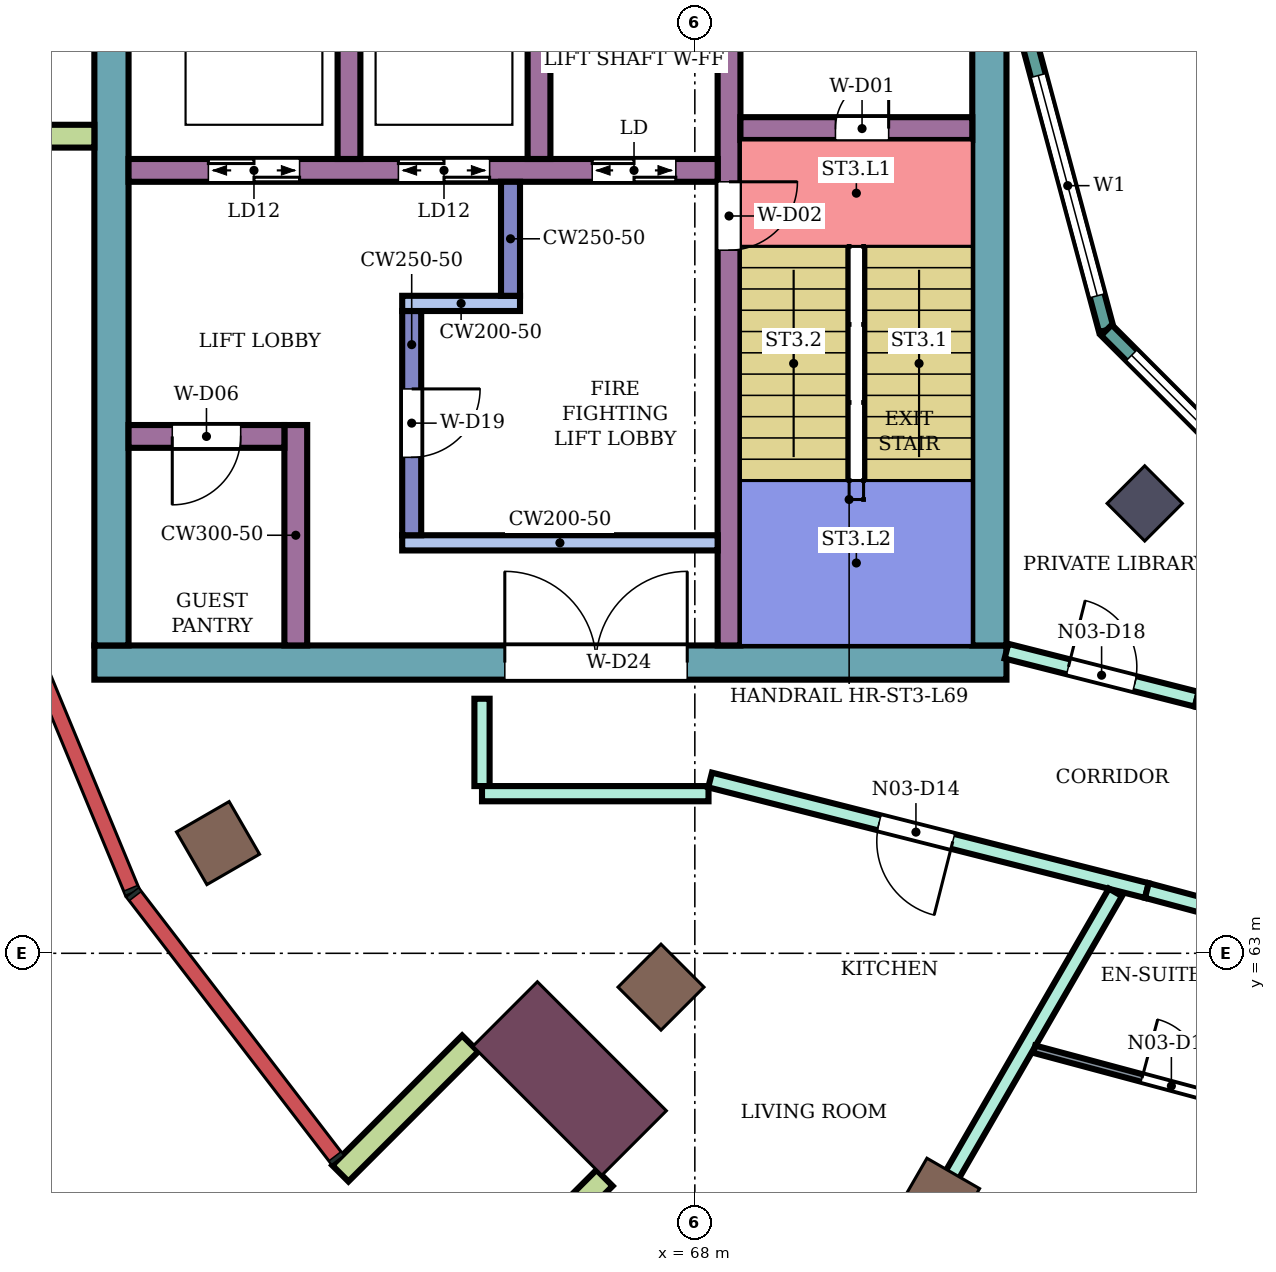
"""IFC4 building model, lengths in metres.
Left out: names, types, materials, properties, quantities, classifications, styles, units other than length and angle.
Written with IfcOpenShell. Run it as: python <this file> out.ifc"""

import sys

from ifc_helpers import new_model, si_unit, direction, frame, frame_2d, origin, origin_2d, place, context, subcontext, project, spatial, rectangle, extrude, element, fill, save


model = new_model("IFC4")
c1 = context("Model", 3, precision=1e-05, world=origin(), true_north=direction((0.0, 1.0)))
c2 = subcontext(c1, "Body", "Model", "MODEL_VIEW")
j1 = project(units=[si_unit("LENGTHUNIT", "METRE"), si_unit("PLANEANGLEUNIT", "RADIAN")], contexts=[c1])
p1 = place(None, origin())
s1 = spatial("IfcSite", under=j1, at=p1, CompositionType="ELEMENT")
p2 = place(p1, origin())
s2 = spatial("IfcBuilding", under=s1, at=p2, CompositionType="ELEMENT")
p3 = place(p2, frame((0.0, 0.0, 300.9)))
s3 = spatial("IfcBuildingStorey", under=s2, at=p3, CompositionType="ELEMENT", Elevation=300.9)
for number, where, z_axis, x_axis in (
    (1, (61.727, 64.45, 0.0), (0.0, 0.0, 1.0), (-0.866, -0.5, 0.0)),
    (2, (67.555, 62.555, 0.0), (0.0, 0.0, 1.0), (-0.707, -0.707, 0.0)),
    (3, (71.2, 59.758, 0.0), (0.0, 0.0, 1.0), (-0.5, -0.866, 0.0)),
):
    element("IfcColumn", number, at=place(p3, frame(where, z_axis=z_axis, x_axis=x_axis)), inside=s3, PredefinedType="COLUMN", context=c2, shape_type="SweptSolid", body=[
        extrude(rectangle(XDim=0.8, YDim=0.8, at=origin_2d()), origin(), (0.0, 0.0, 1.0), 4.2),
    ])
p4 = place(p3, frame((73.919, 68.919, 0.0), z_axis=(0.0, 0.0, 1.0), x_axis=(-0.707106781187, -0.707106781187, 0.0)))
e4 = element("IfcColumn", 4, at=p4, inside=s3, PredefinedType="COLUMN", context=c2, shape_type="SweptSolid", body=[
    extrude(rectangle(XDim=0.7, YDim=0.7, at=origin_2d()), origin(), (0.0, 0.0, 1.0), 4.2),
])
p5 = place(p3, frame((66.353, 61.353, 0.0), z_axis=(0.0, 0.0, 1.0), x_axis=(-0.707106781187, -0.707106781187, 0.0)))
e5 = element("IfcColumn", 5, at=p5, inside=s3, PredefinedType="COLUMN", context=c2, shape_type="SweptSolid", body=[
    extrude(rectangle(XDim=1.2, YDim=2.4, at=origin_2d()), origin(), (0.0, 0.0, 1.0), 4.2),
])
p6 = place(p3, frame((72.1, 66.825, 0.0), z_axis=(0.0, 0.0, 1.0), x_axis=(-1.0, 0.0, 0.0)))
e6 = element("IfcWall", 6, at=p6, inside=s3, PredefinedType="SHEAR", context=c2, shape_type="SweptSolid", body=[
    extrude(rectangle(XDim=12.0, YDim=0.45, at=frame_2d((6.0, 0.0))), origin(), (0.0, 0.0, 1.0), 3.88),
])
p7 = place(p6, frame((4.2, 0.0, 0.0)))
e7 = element("IfcOpeningElement", 7, at=p7, cuts=e6, PredefinedType="OPENING", context=c2, shape_type="SweptSolid", body=[
    extrude(rectangle(XDim=2.4, YDim=2.4, at=frame_2d((1.2, 1.2))), frame((0.0, 0.235, 0.0), z_axis=(0.0, -1.0, 0.0), x_axis=(1.0, 0.0, 0.0)), (0.0, 0.0, 1.0), 0.47),
])
p8 = place(p3, frame((71.875, 75.0, 0.0), z_axis=(0.0, 0.0, 1.0), x_axis=(0.0, -1.0, 0.0)))
e8 = element("IfcWall", 8, at=p8, inside=s3, PredefinedType="SHEAR", context=c2, shape_type="SweptSolid", body=[
    extrude(rectangle(XDim=7.95, YDim=0.45, at=frame_2d((3.975, 0.0))), origin(), (0.0, 0.0, 1.0), 3.88),
])
p9 = place(p3, frame((60.325, 76.4, 0.0), z_axis=(0.0, 0.0, 1.0), x_axis=(0.0, -1.0, 0.0)))
e9 = element("IfcWall", 9, at=p9, inside=s3, PredefinedType="SHEAR", context=c2, shape_type="SweptSolid", body=[
    extrude(rectangle(XDim=9.35, YDim=0.45, at=frame_2d((4.675, 0.0))), origin(), (0.0, 0.0, 1.0), 3.88),
])
p10 = place(p3, frame((68.45, 75.0, 0.0), z_axis=(0.0, 0.0, 1.0), x_axis=(0.0, -1.0, 0.0)))
e10 = element("IfcWall", 10, at=p10, inside=s3, PredefinedType="SHEAR", context=c2, shape_type="SweptSolid", body=[
    extrude(rectangle(XDim=7.95, YDim=0.3, at=frame_2d((3.975, 0.0))), origin(), (0.0, 0.0, 1.0), 3.88),
])
p11 = place(p10, frame((1.85, 0.0, 0.0)))
e11 = element("IfcOpeningElement", 11, at=p11, cuts=e10, PredefinedType="OPENING", context=c2, shape_type="SweptSolid", body=[
    extrude(rectangle(XDim=0.9, YDim=2.1, at=frame_2d((0.45, 1.05))), frame((0.0, 0.16, 0.0), z_axis=(0.0, -1.0, 0.0), x_axis=(1.0, 0.0, 0.0)), (0.0, 0.0, 1.0), 0.32),
])
p12 = place(p3, frame((71.65, 73.85, 0.0), z_axis=(0.0, 0.0, 1.0), x_axis=(-1.0, 0.0, 0.0)))
e12 = element("IfcWall", 12, at=p12, inside=s3, PredefinedType="SHEAR", context=c2, shape_type="SweptSolid", body=[
    extrude(rectangle(XDim=3.05, YDim=0.3, at=frame_2d((1.525, 0.0))), origin(), (0.0, 0.0, 1.0), 3.88),
])
p13 = place(p12, frame((1.1, 0.0, 0.0)))
e13 = element("IfcOpeningElement", 13, at=p13, cuts=e12, PredefinedType="OPENING", context=c2, shape_type="SweptSolid", body=[
    extrude(rectangle(XDim=0.7, YDim=2.0, at=frame_2d((0.35, 1.0))), frame((0.0, 0.16, 0.0), z_axis=(0.0, -1.0, 0.0), x_axis=(1.0, 0.0, 0.0)), (0.0, 0.0, 1.0), 0.32),
])
p14 = place(p3, frame((68.3, 73.3, 0.0), z_axis=(0.0, 0.0, 1.0), x_axis=(-1.0, 0.0, 0.0)))
e14 = element("IfcWall", 14, at=p14, inside=s3, PredefinedType="SHEAR", context=c2, shape_type="SweptSolid", body=[
    extrude(rectangle(XDim=7.75, YDim=0.3, at=frame_2d((3.875, 0.0))), origin(), (0.0, 0.0, 1.0), 3.88),
])
p15 = place(p14, frame((0.55, 0.0, 0.0)))
e15 = element("IfcOpeningElement", 15, at=p15, cuts=e14, PredefinedType="OPENING", context=c2, shape_type="SweptSolid", body=[
    extrude(rectangle(XDim=1.1, YDim=2.1, at=frame_2d((0.55, 1.05))), frame((0.0, 0.16, 0.0), z_axis=(0.0, -1.0, 0.0), x_axis=(1.0, 0.0, 0.0)), (0.0, 0.0, 1.0), 0.32),
])
p16 = place(p14, frame((3.0, 0.0, 0.0)))
e16 = element("IfcOpeningElement", 16, at=p16, cuts=e14, PredefinedType="OPENING", context=c2, shape_type="SweptSolid", body=[
    extrude(rectangle(XDim=1.2, YDim=2.1, at=frame_2d((0.6, 1.05))), frame((0.0, 0.16, 0.0), z_axis=(0.0, -1.0, 0.0), x_axis=(1.0, 0.0, 0.0)), (0.0, 0.0, 1.0), 0.32),
])
p17 = place(p14, frame((5.5, 0.0, 0.0)))
e17 = element("IfcOpeningElement", 17, at=p17, cuts=e14, PredefinedType="OPENING", context=c2, shape_type="SweptSolid", body=[
    extrude(rectangle(XDim=1.2, YDim=2.1, at=frame_2d((0.6, 1.05))), frame((0.0, 0.16, 0.0), z_axis=(0.0, -1.0, 0.0), x_axis=(1.0, 0.0, 0.0)), (0.0, 0.0, 1.0), 0.32),
])
for number, where, z_axis, x_axis in (
    (18, (65.95, 76.0, 0.0), (0.0, 0.0, 1.0), (0.0, -1.0, 0.0)),
    (19, (63.45, 76.0, 0.0), (0.0, 0.0, 1.0), (0.0, -1.0, 0.0)),
):
    element("IfcWall", number, at=place(p3, frame(where, z_axis=z_axis, x_axis=x_axis)), inside=s3, PredefinedType="SHEAR", context=c2, shape_type="SweptSolid", body=[
        extrude(rectangle(XDim=2.55, YDim=0.3, at=frame_2d((1.275, 0.0))), origin(), (0.0, 0.0, 1.0), 3.88),
    ])
p18 = place(p3, frame((68.3, 68.4, 0.0), z_axis=(0.0, 0.0, 1.0), x_axis=(-1.0, 0.0, 0.0)))
e20 = element("IfcWall", 20, at=p18, inside=s3, PredefinedType="SHEAR", context=c2, shape_type="SweptSolid", body=[
    extrude(rectangle(XDim=4.15, YDim=0.2, at=frame_2d((2.075, 0.0))), origin(), (0.0, 0.0, 1.0), 3.88),
])
p19 = place(p3, frame((64.275, 71.45, 0.0), z_axis=(0.0, 0.0, 1.0), x_axis=(0.0, -1.0, 0.0)))
e21 = element("IfcWall", 21, at=p19, inside=s3, PredefinedType="SHEAR", context=c2, shape_type="SweptSolid", body=[
    extrude(rectangle(XDim=2.95, YDim=0.25, at=frame_2d((1.475, 0.0))), origin(), (0.0, 0.0, 1.0), 3.88),
])
p20 = place(p19, frame((1.025, 0.0, 0.0)))
e22 = element("IfcOpeningElement", 22, at=p20, cuts=e21, PredefinedType="OPENING", context=c2, shape_type="SweptSolid", body=[
    extrude(rectangle(XDim=0.9, YDim=2.1, at=frame_2d((0.45, 1.05))), frame((0.0, 0.135, 0.0), z_axis=(0.0, -1.0, 0.0), x_axis=(1.0, 0.0, 0.0)), (0.0, 0.0, 1.0), 0.27),
])
p21 = place(p3, frame((65.7, 71.55, 0.0), z_axis=(0.0, 0.0, 1.0), x_axis=(-1.0, 0.0, 0.0)))
e23 = element("IfcWall", 23, at=p21, inside=s3, PredefinedType="SHEAR", context=c2, shape_type="SweptSolid", body=[
    extrude(rectangle(XDim=1.55, YDim=0.2, at=frame_2d((0.775, 0.0))), origin(), (0.0, 0.0, 1.0), 3.88),
])
p22 = place(p3, frame((65.575, 73.15, 0.0), z_axis=(0.0, 0.0, 1.0), x_axis=(0.0, -1.0, 0.0)))
e24 = element("IfcWall", 24, at=p22, inside=s3, PredefinedType="SHEAR", context=c2, shape_type="SweptSolid", body=[
    extrude(rectangle(XDim=1.5, YDim=0.25, at=frame_2d((0.75, 0.0))), origin(), (0.0, 0.0, 1.0), 3.88),
])
p23 = place(p3, frame((62.75, 69.95, 0.0), z_axis=(0.0, 0.0, 1.0), x_axis=(0.0, -1.0, 0.0)))
e25 = element("IfcWall", 25, at=p23, inside=s3, PredefinedType="SHEAR", context=c2, shape_type="SweptSolid", body=[
    extrude(rectangle(XDim=2.9, YDim=0.3, at=frame_2d((1.45, 0.0))), origin(), (0.0, 0.0, 1.0), 3.88),
])
p24 = place(p3, frame((62.6, 69.8, 0.0), z_axis=(0.0, 0.0, 1.0), x_axis=(-1.0, 0.0, 0.0)))
e26 = element("IfcWall", 26, at=p24, inside=s3, PredefinedType="SHEAR", context=c2, shape_type="SweptSolid", body=[
    extrude(rectangle(XDim=2.05, YDim=0.3, at=frame_2d((1.025, 0.0))), origin(), (0.0, 0.0, 1.0), 3.88),
])
p25 = place(p24, frame((0.575, 0.0, 0.0)))
e27 = element("IfcOpeningElement", 27, at=p25, cuts=e26, PredefinedType="OPENING", context=c2, shape_type="SweptSolid", body=[
    extrude(rectangle(XDim=0.9, YDim=2.1, at=frame_2d((0.45, 1.05))), frame((0.0, 0.16, 0.0), z_axis=(0.0, -1.0, 0.0), x_axis=(1.0, 0.0, 0.0)), (0.0, 0.0, 1.0), 0.32),
])
for number, where, z_axis, x_axis in (
    (28, (60.1, 73.75, 0.0), (0.0, 0.0, 1.0), (-1.0, 0.0, 0.0)),
    (29, (65.045, 61.812, 0.0), (0.0, 0.0, 1.0), (-0.707, -0.707, 0.0)),
    (30, (66.812, 60.045, 0.0), (0.0, 0.0, 1.0), (-0.707, -0.707, 0.0)),
):
    element("IfcWall", number, at=place(p3, frame(where, z_axis=z_axis, x_axis=x_axis)), inside=s3, PredefinedType="NOTDEFINED", context=c2, shape_type="SweptSolid", body=[
        extrude(rectangle(XDim=2.416, YDim=0.3, at=frame_2d((1.208, 0.0))), origin(), (0.0, 0.0, 1.0), 4.2),
    ])
p26 = place(p3, frame((72.396, 75.0, 0.0), z_axis=(0.0, 0.0, 1.0), x_axis=(0.258789828301, -0.965933654434, 0.0)))
e31 = element("IfcWall", 31, at=p26, inside=s3, PredefinedType="NOTDEFINED", context=c2, shape_type="SweptSolid", body=[
    extrude(rectangle(XDim=3.936, YDim=0.2, at=frame_2d((1.968, 0.0))), origin(), (0.0, 0.0, 1.0), 4.2),
])
p27 = place(p26, frame((0.468, 0.0, 0.9)))
e32 = element("IfcOpeningElement", 32, at=p27, cuts=e31, PredefinedType="OPENING", context=c2, shape_type="SweptSolid", body=[
    extrude(rectangle(XDim=3.0, YDim=2.3, at=frame_2d((1.5, 1.15))), frame((0.0, 0.11, 0.0), z_axis=(0.0, -1.0, 0.0), x_axis=(1.0, 0.0, 0.0)), (0.0, 0.0, 1.0), 0.22),
])
p28 = place(p3, frame((73.415, 71.198, 0.0), z_axis=(0.0, 0.0, 1.0), x_axis=(0.707106781187, -0.707106781187, 0.0)))
e33 = element("IfcWall", 33, at=p28, inside=s3, PredefinedType="NOTDEFINED", context=c2, shape_type="SweptSolid", body=[
    extrude(rectangle(XDim=3.936, YDim=0.2, at=frame_2d((1.968, 0.0))), origin(), (0.0, 0.0, 1.0), 4.2),
])
p29 = place(p28, frame((0.468, 0.0, 0.9)))
e34 = element("IfcOpeningElement", 34, at=p29, cuts=e33, PredefinedType="OPENING", context=c2, shape_type="SweptSolid", body=[
    extrude(rectangle(XDim=3.0, YDim=2.3, at=frame_2d((1.5, 1.15))), frame((0.0, 0.11, 0.0), z_axis=(0.0, -1.0, 0.0), x_axis=(1.0, 0.0, 0.0)), (0.0, 0.0, 1.0), 0.22),
])
p30 = place(p3, frame((65.2, 65.2, 0.0), z_axis=(0.0, 0.0, 1.0), x_axis=(0.0, 1.0, 0.0)))
e35 = element("IfcWall", 35, at=p30, inside=s3, PredefinedType="PARTITIONING", context=c2, shape_type="SweptSolid", body=[
    extrude(rectangle(XDim=1.149, YDim=0.2, at=frame_2d((0.575, 0.0))), origin(), (0.0, 0.0, 1.0), 3.75),
])
p31 = place(p3, frame((65.2, 65.1, 0.0), z_axis=(0.0, 0.0, 1.0), x_axis=(1.0, 0.0, 0.0)))
e36 = element("IfcWall", 36, at=p31, inside=s3, PredefinedType="PARTITIONING", context=c2, shape_type="SweptSolid", body=[
    extrude(rectangle(XDim=2.98, YDim=0.2, at=frame_2d((1.49, 0.0))), origin(), (0.0, 0.0, 1.0), 3.75),
])
p32 = place(p3, frame((68.201, 65.28, 0.0), z_axis=(0.0, 0.0, 1.0), x_axis=(0.969421088032, -0.245403247897, 0.0)))
e37 = element("IfcWall", 37, at=p32, inside=s3, PredefinedType="PARTITIONING", context=c2, shape_type="SweptSolid", body=[
    extrude(rectangle(XDim=5.927, YDim=0.2, at=frame_2d((2.964, 0.0))), origin(), (0.0, 0.0, 1.0), 3.75),
])
p33 = place(p32, frame((2.293, 0.0, 0.0)))
e38 = element("IfcOpeningElement", 38, at=p33, cuts=e37, PredefinedType="OPENING", context=c2, shape_type="SweptSolid", body=[
    extrude(rectangle(XDim=1.0, YDim=2.1, at=frame_2d((0.5, 1.05))), frame((0.0, 0.11, 0.0), z_axis=(0.0, -1.0, 0.0), x_axis=(1.0, 0.0, 0.0)), (0.0, 0.0, 1.0), 0.22),
])
p34 = place(p3, frame((68.849, 55.692, 0.0), z_axis=(0.0, 0.0, 1.0), x_axis=(0.50011732958, 0.865957652922, 0.0)))
e39 = element("IfcWall", 39, at=p34, inside=s3, PredefinedType="PARTITIONING", context=c2, shape_type="SweptSolid", body=[
    extrude(rectangle(XDim=9.365, YDim=0.2, at=frame_2d((4.683, 0.0))), origin(), (0.0, 0.0, 1.0), 3.75),
])
p35 = place(p3, frame((72.1, 66.975, 0.0), z_axis=(0.0, 0.0, 1.0), x_axis=(0.969471314457, -0.245204752086, 0.0)))
e40 = element("IfcWall", 40, at=p35, inside=s3, PredefinedType="PARTITIONING", context=c2, shape_type="SweptSolid", body=[
    extrude(rectangle(XDim=2.582, YDim=0.2, at=frame_2d((1.291, 0.0))), origin(), (0.0, 0.0, 1.0), 3.75),
])
p36 = place(p35, frame((0.841, 0.0, 0.0)))
e41 = element("IfcOpeningElement", 41, at=p36, cuts=e40, PredefinedType="OPENING", context=c2, shape_type="SweptSolid", body=[
    extrude(rectangle(XDim=0.9, YDim=2.1, at=frame_2d((0.45, 1.05))), frame((0.0, 0.11, 0.0), z_axis=(0.0, -1.0, 0.0), x_axis=(1.0, 0.0, 0.0)), (0.0, 0.0, 1.0), 0.22),
])
p37 = place(p3, frame((73.947, 63.826, 0.0), z_axis=(0.0, 0.0, 1.0), x_axis=(0.965908253407, -0.258884619088, 0.0)))
e42 = element("IfcWall", 42, at=p37, inside=s3, PredefinedType="PARTITIONING", context=c2, shape_type="SweptSolid", body=[
    extrude(rectangle(XDim=6.217, YDim=0.2, at=frame_2d((3.108, 0.0))), origin(), (0.0, 0.0, 1.0), 3.75),
])
p38 = place(p3, frame((74.603, 66.342, 0.0), z_axis=(0.0, 0.0, 1.0), x_axis=(0.965920893652, -0.258837453254, 0.0)))
e43 = element("IfcWall", 43, at=p38, inside=s3, PredefinedType="PARTITIONING", context=c2, shape_type="SweptSolid", body=[
    extrude(rectangle(XDim=5.458, YDim=0.2, at=frame_2d((2.729, 0.0))), origin(), (0.0, 0.0, 1.0), 3.75),
])
p39 = place(p38, frame((2.512, 0.0, 0.0)))
e44 = element("IfcOpeningElement", 44, at=p39, cuts=e43, PredefinedType="OPENING", context=c2, shape_type="SweptSolid", body=[
    extrude(rectangle(XDim=0.9, YDim=2.1, at=frame_2d((0.45, 1.05))), frame((0.0, 0.11, 0.0), z_axis=(0.0, -1.0, 0.0), x_axis=(1.0, 0.0, 0.0)), (0.0, 0.0, 1.0), 0.22),
])
p40 = place(p3, frame((72.465, 61.739, 0.0), z_axis=(0.0, 0.0, 1.0), x_axis=(0.965899611634, -0.258916859715, 0.0)))
e45 = element("IfcWall", 45, at=p40, inside=s3, PredefinedType="PARTITIONING", context=c2, shape_type="SweptSolid", body=[
    extrude(rectangle(XDim=7.74, YDim=0.1, at=frame_2d((3.87, 0.0))), origin(), (0.0, 0.0, 1.0), 3.75),
])
p41 = place(p40, frame((1.468, 0.0, 0.0)))
e46 = element("IfcOpeningElement", 46, at=p41, cuts=e45, PredefinedType="OPENING", context=c2, shape_type="SweptSolid", body=[
    extrude(rectangle(XDim=0.8, YDim=2.1, at=frame_2d((0.4, 1.05))), frame((0.0, 0.06, 0.0), z_axis=(0.0, -1.0, 0.0), x_axis=(1.0, 0.0, 0.0)), (0.0, 0.0, 1.0), 0.12),
])
p42 = place(p3, frame((74.229, 53.462, 0.0), z_axis=(0.0, 0.0, 1.0), x_axis=(0.258810097991, 0.965928223616, 0.0)))
e47 = element("IfcWall", 47, at=p42, inside=s3, PredefinedType="PARTITIONING", context=c2, shape_type="SweptSolid", body=[
    extrude(rectangle(XDim=9.838, YDim=0.1, at=frame_2d((4.919, 0.0))), origin(), (0.0, 0.0, 1.0), 3.75),
])
p43 = place(p42, frame((3.344, 0.0, 0.0)))
e48 = element("IfcOpeningElement", 48, at=p43, cuts=e47, PredefinedType="OPENING", context=c2, shape_type="SweptSolid", body=[
    extrude(rectangle(XDim=0.9, YDim=2.1, at=frame_2d((0.45, 1.05))), frame((0.0, 0.06, 0.0), z_axis=(0.0, -1.0, 0.0), x_axis=(1.0, 0.0, 0.0)), (0.0, 0.0, 1.0), 0.12),
])
p44 = place(p27, origin())
e49 = element("IfcWindow", 49, at=p44, inside=s3, PartitioningType="SINGLE_PANEL", PredefinedType="WINDOW", context=c2, shape_type="SweptSolid", body=[
    extrude(rectangle(XDim=3.0, YDim=2.3, at=frame_2d((1.5, 1.15))), frame((0.0, 0.03, 0.0), z_axis=(0.0, -1.0, 0.0), x_axis=(1.0, 0.0, 0.0)), (0.0, 0.0, 1.0), 0.06),
])
fill(e32, e49)
p45 = place(p29, origin())
e50 = element("IfcWindow", 50, at=p45, inside=s3, PartitioningType="SINGLE_PANEL", PredefinedType="WINDOW", context=c2, shape_type="SweptSolid", body=[
    extrude(rectangle(XDim=3.0, YDim=2.3, at=frame_2d((1.5, 1.15))), frame((0.0, 0.03, 0.0), z_axis=(0.0, -1.0, 0.0), x_axis=(1.0, 0.0, 0.0)), (0.0, 0.0, 1.0), 0.06),
])
fill(e34, e50)
p46 = place(p41, origin())
e51 = element("IfcDoor", 51, at=p46, inside=s3, OperationType="SINGLE_SWING_LEFT", PredefinedType="DOOR", context=c2, shape_type="SweptSolid", body=[
    extrude(rectangle(XDim=0.8, YDim=2.1, at=frame_2d((0.4, 1.05))), frame((0.0, 0.025, 0.0), z_axis=(0.0, -1.0, 0.0), x_axis=(1.0, 0.0, 0.0)), (0.0, 0.0, 1.0), 0.05),
])
fill(e46, e51)
p47 = place(p33, frame((1.0, 0.0, 0.0), z_axis=(0.0, 0.0, 1.0), x_axis=(-1.0, 0.0, 0.0)))
e52 = element("IfcDoor", 52, at=p47, inside=s3, OperationType="SINGLE_SWING_LEFT", PredefinedType="DOOR", context=c2, shape_type="SweptSolid", body=[
    extrude(rectangle(XDim=1.0, YDim=2.1, at=frame_2d((0.5, 1.05))), frame((0.0, 0.025, 0.0), z_axis=(0.0, -1.0, 0.0), x_axis=(1.0, 0.0, 0.0)), (0.0, 0.0, 1.0), 0.05),
])
fill(e38, e52)
p48 = place(p36, origin())
e53 = element("IfcDoor", 53, at=p48, inside=s3, OperationType="SINGLE_SWING_LEFT", PredefinedType="DOOR", context=c2, shape_type="SweptSolid", body=[
    extrude(rectangle(XDim=0.9, YDim=2.1, at=frame_2d((0.45, 1.05))), frame((0.0, 0.025, 0.0), z_axis=(0.0, -1.0, 0.0), x_axis=(1.0, 0.0, 0.0)), (0.0, 0.0, 1.0), 0.05),
])
fill(e41, e53)
p49 = place(p13, frame((0.7, 0.0, 0.0), z_axis=(0.0, 0.0, 1.0), x_axis=(-1.0, 0.0, 0.0)))
e54 = element("IfcDoor", 54, at=p49, inside=s3, OperationType="SINGLE_SWING_RIGHT", PredefinedType="DOOR", context=c2, shape_type="SweptSolid", body=[
    extrude(rectangle(XDim=0.7, YDim=2.0, at=frame_2d((0.35, 1.0))), frame((0.0, 0.025, 0.0), z_axis=(0.0, -1.0, 0.0), x_axis=(1.0, 0.0, 0.0)), (0.0, 0.0, 1.0), 0.05),
])
fill(e13, e54)
p50 = place(p11, origin())
e55 = element("IfcDoor", 55, at=p50, inside=s3, OperationType="SINGLE_SWING_LEFT", PredefinedType="DOOR", context=c2, shape_type="SweptSolid", body=[
    extrude(rectangle(XDim=0.9, YDim=2.1, at=frame_2d((0.45, 1.05))), frame((0.0, 0.025, 0.0), z_axis=(0.0, -1.0, 0.0), x_axis=(1.0, 0.0, 0.0)), (0.0, 0.0, 1.0), 0.05),
])
fill(e11, e55)
p51 = place(p15, origin())
e56 = element("IfcDoor", 56, at=p51, inside=s3, OperationType="DOUBLE_DOOR_SLIDING", PredefinedType="DOOR", context=c2, shape_type="SweptSolid", body=[
    extrude(rectangle(XDim=1.1, YDim=2.1, at=frame_2d((0.55, 1.05))), frame((0.0, 0.025, 0.0), z_axis=(0.0, -1.0, 0.0), x_axis=(1.0, 0.0, 0.0)), (0.0, 0.0, 1.0), 0.05),
])
fill(e15, e56)
p52 = place(p16, origin())
e57 = element("IfcDoor", 57, at=p52, inside=s3, OperationType="DOUBLE_DOOR_SLIDING", PredefinedType="DOOR", context=c2, shape_type="SweptSolid", body=[
    extrude(rectangle(XDim=1.2, YDim=2.1, at=frame_2d((0.6, 1.05))), frame((0.0, 0.025, 0.0), z_axis=(0.0, -1.0, 0.0), x_axis=(1.0, 0.0, 0.0)), (0.0, 0.0, 1.0), 0.05),
])
fill(e16, e57)
p53 = place(p17, origin())
e58 = element("IfcDoor", 58, at=p53, inside=s3, OperationType="DOUBLE_DOOR_SLIDING", PredefinedType="DOOR", context=c2, shape_type="SweptSolid", body=[
    extrude(rectangle(XDim=1.2, YDim=2.1, at=frame_2d((0.6, 1.05))), frame((0.0, 0.025, 0.0), z_axis=(0.0, -1.0, 0.0), x_axis=(1.0, 0.0, 0.0)), (0.0, 0.0, 1.0), 0.05),
])
fill(e17, e58)
p54 = place(p20, origin())
e59 = element("IfcDoor", 59, at=p54, inside=s3, OperationType="SINGLE_SWING_LEFT", PredefinedType="DOOR", context=c2, shape_type="SweptSolid", body=[
    extrude(rectangle(XDim=0.9, YDim=2.1, at=frame_2d((0.45, 1.05))), frame((0.0, 0.025, 0.0), z_axis=(0.0, -1.0, 0.0), x_axis=(1.0, 0.0, 0.0)), (0.0, 0.0, 1.0), 0.05),
])
fill(e22, e59)
p55 = place(p25, origin())
e60 = element("IfcDoor", 60, at=p55, inside=s3, OperationType="SINGLE_SWING_RIGHT", PredefinedType="DOOR", context=c2, shape_type="SweptSolid", body=[
    extrude(rectangle(XDim=0.9, YDim=2.1, at=frame_2d((0.45, 1.05))), frame((0.0, 0.025, 0.0), z_axis=(0.0, -1.0, 0.0), x_axis=(1.0, 0.0, 0.0)), (0.0, 0.0, 1.0), 0.05),
])
fill(e27, e60)
p56 = place(p7, frame((2.4, 0.0, 0.0), z_axis=(0.0, 0.0, 1.0), x_axis=(-1.0, 0.0, 0.0)))
e61 = element("IfcDoor", 61, at=p56, inside=s3, OperationType="DOUBLE_DOOR_SINGLE_SWING", PredefinedType="DOOR", context=c2, shape_type="SweptSolid", body=[
    extrude(rectangle(XDim=2.4, YDim=2.4, at=frame_2d((1.2, 1.2))), frame((0.0, 0.025, 0.0), z_axis=(0.0, -1.0, 0.0), x_axis=(1.0, 0.0, 0.0)), (0.0, 0.0, 1.0), 0.05),
])
fill(e7, e61)
save(model, sys.argv[1])
